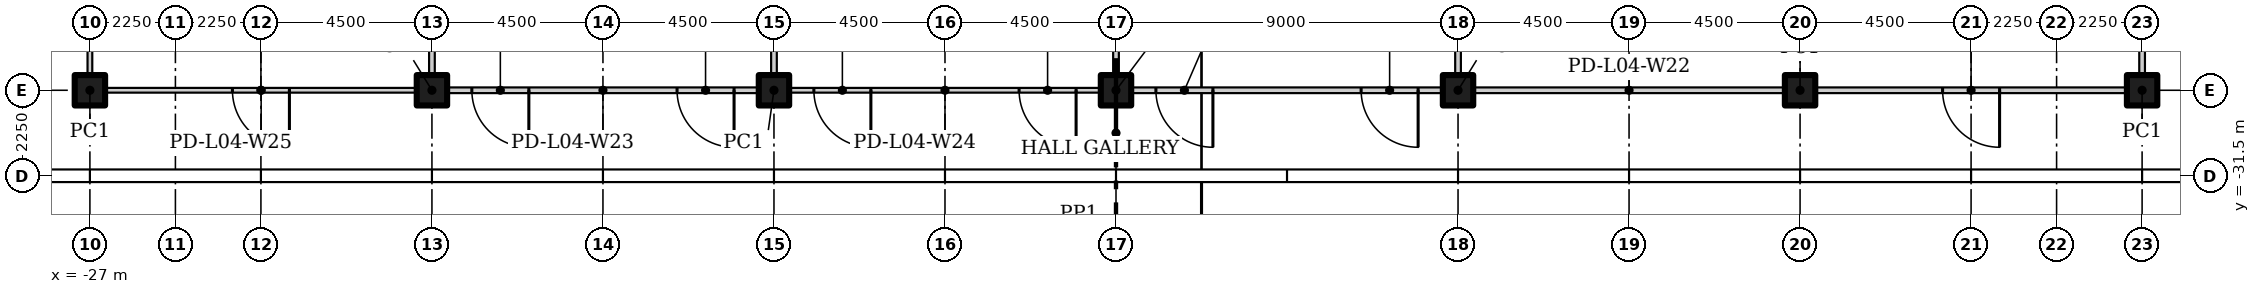
"""IFC4 building model, lengths in metres.
Left out: names, types, materials, properties, quantities, classifications, styles, units other than length and angle.
Written with IfcOpenShell. Run it as: python <this file> out.ifc"""

import sys

from ifc_helpers import new_model, si_unit, direction, frame, frame_2d, origin, origin_2d, place, context, subcontext, project, spatial, rectangle, hollow_rectangle, extrude, element, fill, save


model = new_model("IFC4")
c1 = context("Model", 3, precision=1e-05, world=origin(), true_north=direction((0.0, 1.0)))
c2 = subcontext(c1, "Body", "Model", "MODEL_VIEW")
j1 = project(units=[si_unit("LENGTHUNIT", "METRE"), si_unit("PLANEANGLEUNIT", "RADIAN")], contexts=[c1])
p1 = place(None, origin())
s1 = spatial("IfcSite", under=j1, at=p1, CompositionType="ELEMENT")
p2 = place(p1, origin())
s2 = spatial("IfcBuilding", under=s1, at=p2, CompositionType="ELEMENT")
p3 = place(p2, frame((0.0, 0.0, 23.5)))
s3 = spatial("IfcBuildingStorey", under=s2, at=p3, CompositionType="ELEMENT", Elevation=23.5)
for number, where in (
    (1, (-27.0, -29.25, 0.0)),
    (2, (-18.0, -29.25, 0.0)),
    (3, (-9.0, -29.25, 0.0)),
    (4, (0.0, -29.25, 0.0)),
    (5, (9.0, -29.25, 0.0)),
    (6, (18.0, -29.25, 0.0)),
    (7, (27.0, -29.25, 0.0)),
):
    element("IfcColumn", number, at=place(p3, frame(where)), inside=s3, PredefinedType="COLUMN", context=c2, shape_type="SweptSolid", body=[
        extrude(hollow_rectangle(XDim=0.8, YDim=0.8, WallThickness=0.03, at=origin_2d()), origin(), (0.0, 0.0, 1.0), 4.65),
    ])
p4 = place(p3, frame((-27.0, -29.188, 0.0), z_axis=(0.0, 0.0, 1.0), x_axis=(0.0, 1.0, 0.0)))
e8 = element("IfcWall", 8, at=p4, inside=s3, PredefinedType="PARTITIONING", context=c2, shape_type="SweptSolid", body=[
    extrude(rectangle(XDim=22.438, YDim=0.125, at=frame_2d((11.219, 0.0))), origin(), (0.0, 0.0, 1.0), 4.65),
])
p5 = place(p4, frame((3.087, 0.0, 0.0)))
e9 = element("IfcOpeningElement", 9, at=p5, cuts=e8, PredefinedType="OPENING", context=c2, shape_type="SweptSolid", body=[
    extrude(rectangle(XDim=1.5, YDim=2.1, at=frame_2d((0.75, 1.05))), frame((0.0, 0.073, 0.0), z_axis=(0.0, -1.0, 0.0), x_axis=(1.0, 0.0, 0.0)), (0.0, 0.0, 1.0), 0.145),
])
p6 = place(p4, frame((18.837, 0.0, 0.0)))
e10 = element("IfcOpeningElement", 10, at=p6, cuts=e8, PredefinedType="OPENING", context=c2, shape_type="SweptSolid", body=[
    extrude(rectangle(XDim=1.5, YDim=2.1, at=frame_2d((0.75, 1.05))), frame((0.0, 0.073, 0.0), z_axis=(0.0, -1.0, 0.0), x_axis=(1.0, 0.0, 0.0)), (0.0, 0.0, 1.0), 0.145),
])
p7 = place(p3, frame((27.0, -20.325, 0.0), z_axis=(0.0, 0.0, 1.0), x_axis=(0.0, -1.0, 0.0)))
e11 = element("IfcWall", 11, at=p7, inside=s3, PredefinedType="PARTITIONING", context=c2, shape_type="SweptSolid", body=[
    extrude(rectangle(XDim=8.85, YDim=0.15, at=frame_2d((4.425, 0.0))), origin(), (0.0, 0.0, 1.0), 4.65),
])
p8 = place(p7, frame((4.275, 0.0, 0.0)))
e12 = element("IfcOpeningElement", 12, at=p8, cuts=e11, PredefinedType="OPENING", context=c2, shape_type="SweptSolid", body=[
    extrude(rectangle(XDim=1.5, YDim=2.1, at=frame_2d((0.75, 1.05))), frame((0.0, 0.085, 0.0), z_axis=(0.0, -1.0, 0.0), x_axis=(1.0, 0.0, 0.0)), (0.0, 0.0, 1.0), 0.17),
])
p9 = place(p3, frame((27.075, -29.25, 0.0), z_axis=(0.0, 0.0, 1.0), x_axis=(-1.0, 0.0, 0.0)))
e13 = element("IfcWall", 13, at=p9, inside=s3, PredefinedType="PARTITIONING", context=c2, shape_type="SweptSolid", body=[
    extrude(rectangle(XDim=27.15, YDim=0.15, at=frame_2d((13.575, 0.0))), origin(), (0.0, 0.0, 1.0), 4.65),
])
p10 = place(p9, frame((3.825, 0.0, 0.0)))
e14 = element("IfcOpeningElement", 14, at=p10, cuts=e13, PredefinedType="OPENING", context=c2, shape_type="SweptSolid", body=[
    extrude(rectangle(XDim=1.5, YDim=2.1, at=frame_2d((0.75, 1.05))), frame((0.0, 0.085, 0.0), z_axis=(0.0, -1.0, 0.0), x_axis=(1.0, 0.0, 0.0)), (0.0, 0.0, 1.0), 0.17),
])
p11 = place(p9, frame((19.125, 0.0, 0.0)))
e15 = element("IfcOpeningElement", 15, at=p11, cuts=e13, PredefinedType="OPENING", context=c2, shape_type="SweptSolid", body=[
    extrude(rectangle(XDim=1.5, YDim=2.1, at=frame_2d((0.75, 1.05))), frame((0.0, 0.085, 0.0), z_axis=(0.0, -1.0, 0.0), x_axis=(1.0, 0.0, 0.0)), (0.0, 0.0, 1.0), 0.17),
])
p12 = place(p9, frame((24.525, 0.0, 0.0)))
e16 = element("IfcOpeningElement", 16, at=p12, cuts=e13, PredefinedType="OPENING", context=c2, shape_type="SweptSolid", body=[
    extrude(rectangle(XDim=1.5, YDim=2.1, at=frame_2d((0.75, 1.05))), frame((0.0, 0.085, 0.0), z_axis=(0.0, -1.0, 0.0), x_axis=(1.0, 0.0, 0.0)), (0.0, 0.0, 1.0), 0.17),
])
p13 = place(p3, frame((-8.925, -29.25, 0.0), z_axis=(0.0, 0.0, 1.0), x_axis=(-1.0, 0.0, 0.0)))
e17 = element("IfcWall", 17, at=p13, inside=s3, PredefinedType="PARTITIONING", context=c2, shape_type="SweptSolid", body=[
    extrude(rectangle(XDim=9.15, YDim=0.15, at=frame_2d((4.575, 0.0))), origin(), (0.0, 0.0, 1.0), 4.65),
])
p14 = place(p13, frame((1.125, 0.0, 0.0)))
e18 = element("IfcOpeningElement", 18, at=p14, cuts=e17, PredefinedType="OPENING", context=c2, shape_type="SweptSolid", body=[
    extrude(rectangle(XDim=1.5, YDim=2.1, at=frame_2d((0.75, 1.05))), frame((0.0, 0.085, 0.0), z_axis=(0.0, -1.0, 0.0), x_axis=(1.0, 0.0, 0.0)), (0.0, 0.0, 1.0), 0.17),
])
p15 = place(p13, frame((6.525, 0.0, 0.0)))
e19 = element("IfcOpeningElement", 19, at=p15, cuts=e17, PredefinedType="OPENING", context=c2, shape_type="SweptSolid", body=[
    extrude(rectangle(XDim=1.5, YDim=2.1, at=frame_2d((0.75, 1.05))), frame((0.0, 0.085, 0.0), z_axis=(0.0, -1.0, 0.0), x_axis=(1.0, 0.0, 0.0)), (0.0, 0.0, 1.0), 0.17),
])
p16 = place(p3, frame((0.075, -29.25, 0.0), z_axis=(0.0, 0.0, 1.0), x_axis=(-1.0, 0.0, 0.0)))
e20 = element("IfcWall", 20, at=p16, inside=s3, PredefinedType="PARTITIONING", context=c2, shape_type="SweptSolid", body=[
    extrude(rectangle(XDim=9.15, YDim=0.125, at=frame_2d((4.575, 0.0))), origin(), (0.0, 0.0, 1.0), 4.65),
])
p17 = place(p16, frame((1.125, 0.0, 0.0)))
e21 = element("IfcOpeningElement", 21, at=p17, cuts=e20, PredefinedType="OPENING", context=c2, shape_type="SweptSolid", body=[
    extrude(rectangle(XDim=1.5, YDim=2.1, at=frame_2d((0.75, 1.05))), frame((0.0, 0.073, 0.0), z_axis=(0.0, -1.0, 0.0), x_axis=(1.0, 0.0, 0.0)), (0.0, 0.0, 1.0), 0.145),
])
p18 = place(p16, frame((6.525, 0.0, 0.0)))
e22 = element("IfcOpeningElement", 22, at=p18, cuts=e20, PredefinedType="OPENING", context=c2, shape_type="SweptSolid", body=[
    extrude(rectangle(XDim=1.5, YDim=2.1, at=frame_2d((0.75, 1.05))), frame((0.0, 0.073, 0.0), z_axis=(0.0, -1.0, 0.0), x_axis=(1.0, 0.0, 0.0)), (0.0, 0.0, 1.0), 0.145),
])
p19 = place(p3, frame((-17.925, -29.25, 0.0), z_axis=(0.0, 0.0, 1.0), x_axis=(-1.0, 0.0, 0.0)))
e23 = element("IfcWall", 23, at=p19, inside=s3, PredefinedType="PARTITIONING", context=c2, shape_type="SweptSolid", body=[
    extrude(rectangle(XDim=9.137, YDim=0.125, at=frame_2d((4.569, 0.0))), origin(), (0.0, 0.0, 1.0), 4.65),
])
p20 = place(p19, frame((3.825, 0.0, 0.0)))
e24 = element("IfcOpeningElement", 24, at=p20, cuts=e23, PredefinedType="OPENING", context=c2, shape_type="SweptSolid", body=[
    extrude(rectangle(XDim=1.5, YDim=2.1, at=frame_2d((0.75, 1.05))), frame((0.0, 0.073, 0.0), z_axis=(0.0, -1.0, 0.0), x_axis=(1.0, 0.0, 0.0)), (0.0, 0.0, 1.0), 0.145),
])
p21 = place(p3, frame((0.0, -11.325, 0.0), z_axis=(0.0, 0.0, 1.0), x_axis=(0.0, -1.0, 0.0)))
e25 = element("IfcWall", 25, at=p21, inside=s3, PredefinedType="PARTITIONING", context=c2, shape_type="SweptSolid", body=[
    extrude(rectangle(XDim=17.85, YDim=0.15, at=frame_2d((8.925, 0.0))), origin(), (0.0, 0.0, 1.0), 4.65),
])
p22 = place(p3, frame((9.0, -29.175, 0.0), z_axis=(0.0, 0.0, 1.0), x_axis=(0.0, 1.0, 0.0)))
e26 = element("IfcWall", 26, at=p22, inside=s3, PredefinedType="PARTITIONING", context=c2, shape_type="SweptSolid", body=[
    extrude(rectangle(XDim=8.85, YDim=0.15, at=frame_2d((4.425, 0.0))), origin(), (0.0, 0.0, 1.0), 4.65),
])
for number, where, z_axis, x_axis in (
    (27, (-18.0, -29.175, 0.0), (0.0, 0.0, 1.0), (0.0, 1.0, 0.0)),
    (28, (-9.0, -29.175, 0.0), (0.0, 0.0, 1.0), (0.0, 1.0, 0.0)),
):
    element("IfcWall", number, at=place(p3, frame(where, z_axis=z_axis, x_axis=x_axis)), inside=s3, PredefinedType="PARTITIONING", context=c2, shape_type="SweptSolid", body=[
        extrude(rectangle(XDim=17.85, YDim=0.15, at=frame_2d((8.925, 0.0))), origin(), (0.0, 0.0, 1.0), 4.65),
    ])
p23 = place(p20, origin())
e29 = element("IfcDoor", 29, at=p23, inside=s3, OperationType="DOUBLE_DOOR_SINGLE_SWING", PredefinedType="DOOR", context=c2, shape_type="SweptSolid", body=[
    extrude(rectangle(XDim=1.5, YDim=2.1, at=frame_2d((0.75, 1.05))), frame((0.0, 0.025, 0.0), z_axis=(0.0, -1.0, 0.0), x_axis=(1.0, 0.0, 0.0)), (0.0, 0.0, 1.0), 0.05),
])
fill(e24, e29)
p24 = place(p14, origin())
e30 = element("IfcDoor", 30, at=p24, inside=s3, OperationType="DOUBLE_DOOR_SINGLE_SWING", PredefinedType="DOOR", context=c2, shape_type="SweptSolid", body=[
    extrude(rectangle(XDim=1.5, YDim=2.1, at=frame_2d((0.75, 1.05))), frame((0.0, 0.025, 0.0), z_axis=(0.0, -1.0, 0.0), x_axis=(1.0, 0.0, 0.0)), (0.0, 0.0, 1.0), 0.05),
])
fill(e18, e30)
p25 = place(p15, origin())
e31 = element("IfcDoor", 31, at=p25, inside=s3, OperationType="DOUBLE_DOOR_SINGLE_SWING", PredefinedType="DOOR", context=c2, shape_type="SweptSolid", body=[
    extrude(rectangle(XDim=1.5, YDim=2.1, at=frame_2d((0.75, 1.05))), frame((0.0, 0.025, 0.0), z_axis=(0.0, -1.0, 0.0), x_axis=(1.0, 0.0, 0.0)), (0.0, 0.0, 1.0), 0.05),
])
fill(e19, e31)
p26 = place(p17, origin())
e32 = element("IfcDoor", 32, at=p26, inside=s3, OperationType="DOUBLE_DOOR_SINGLE_SWING", PredefinedType="DOOR", context=c2, shape_type="SweptSolid", body=[
    extrude(rectangle(XDim=1.5, YDim=2.1, at=frame_2d((0.75, 1.05))), frame((0.0, 0.025, 0.0), z_axis=(0.0, -1.0, 0.0), x_axis=(1.0, 0.0, 0.0)), (0.0, 0.0, 1.0), 0.05),
])
fill(e21, e32)
p27 = place(p18, origin())
e33 = element("IfcDoor", 33, at=p27, inside=s3, OperationType="DOUBLE_DOOR_SINGLE_SWING", PredefinedType="DOOR", context=c2, shape_type="SweptSolid", body=[
    extrude(rectangle(XDim=1.5, YDim=2.1, at=frame_2d((0.75, 1.05))), frame((0.0, 0.025, 0.0), z_axis=(0.0, -1.0, 0.0), x_axis=(1.0, 0.0, 0.0)), (0.0, 0.0, 1.0), 0.05),
])
fill(e22, e33)
p28 = place(p10, origin())
e34 = element("IfcDoor", 34, at=p28, inside=s3, OperationType="DOUBLE_DOOR_SINGLE_SWING", PredefinedType="DOOR", context=c2, shape_type="SweptSolid", body=[
    extrude(rectangle(XDim=1.5, YDim=2.1, at=frame_2d((0.75, 1.05))), frame((0.0, 0.025, 0.0), z_axis=(0.0, -1.0, 0.0), x_axis=(1.0, 0.0, 0.0)), (0.0, 0.0, 1.0), 0.05),
])
fill(e14, e34)
p29 = place(p11, origin())
e35 = element("IfcDoor", 35, at=p29, inside=s3, OperationType="DOUBLE_DOOR_SINGLE_SWING", PredefinedType="DOOR", context=c2, shape_type="SweptSolid", body=[
    extrude(rectangle(XDim=1.5, YDim=2.1, at=frame_2d((0.75, 1.05))), frame((0.0, 0.025, 0.0), z_axis=(0.0, -1.0, 0.0), x_axis=(1.0, 0.0, 0.0)), (0.0, 0.0, 1.0), 0.05),
])
fill(e15, e35)
p30 = place(p12, origin())
e36 = element("IfcDoor", 36, at=p30, inside=s3, OperationType="DOUBLE_DOOR_SINGLE_SWING", PredefinedType="DOOR", context=c2, shape_type="SweptSolid", body=[
    extrude(rectangle(XDim=1.5, YDim=2.1, at=frame_2d((0.75, 1.05))), frame((0.0, 0.025, 0.0), z_axis=(0.0, -1.0, 0.0), x_axis=(1.0, 0.0, 0.0)), (0.0, 0.0, 1.0), 0.05),
])
fill(e16, e36)
save(model, sys.argv[1])
